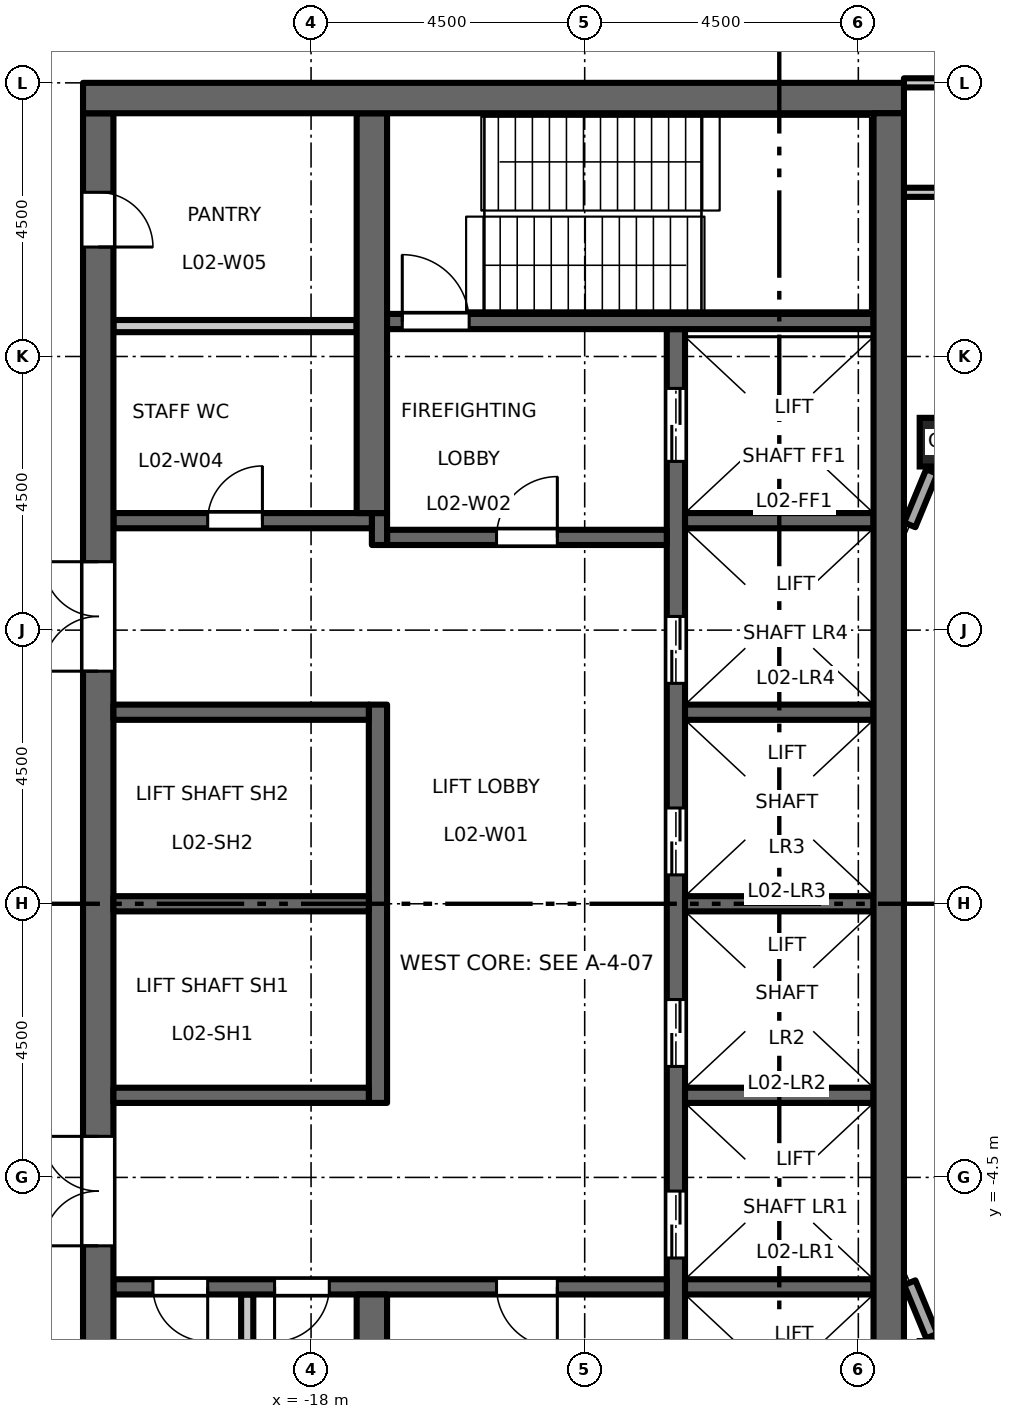
"""IFC4 building model, lengths in metres.
Left out: names, types, materials, properties, quantities, classifications, styles, units other than length and angle.
Written with IfcOpenShell. Run it as: python <this file> out.ifc"""

import sys

from ifc_helpers import new_model, si_unit, direction, frame, frame_2d, origin, origin_2d, place, context, subcontext, project, spatial, rectangle, hollow_rectangle, extrude, element, fill, save


model = new_model("IFC4")
c1 = context("Model", 3, precision=1e-05, world=origin(), true_north=direction((0.0, 1.0)))
c2 = subcontext(c1, "Body", "Model", "MODEL_VIEW")
j1 = project(units=[si_unit("LENGTHUNIT", "METRE"), si_unit("PLANEANGLEUNIT", "RADIAN")], contexts=[c1])
p1 = place(None, origin())
s1 = spatial("IfcSite", under=j1, at=p1, CompositionType="ELEMENT")
p2 = place(p1, origin())
s2 = spatial("IfcBuilding", under=s1, at=p2, CompositionType="ELEMENT")
p3 = place(p2, frame((0.0, 0.0, 12.2)))
s3 = spatial("IfcBuildingStorey", under=s2, at=p3, CompositionType="ELEMENT", Elevation=12.2)
p4 = place(p3, frame((-7.591, 7.591, 0.0), z_axis=(0.0, 0.0, 1.0), x_axis=(1.0, 0.0, 0.0)))
e1 = element("IfcColumn", 1, at=p4, inside=s3, PredefinedType="COLUMN", context=c2, shape_type="SweptSolid", body=[
    extrude(hollow_rectangle(XDim=0.8, YDim=0.8, WallThickness=0.05, at=origin_2d()), origin(), (0.0, 0.0, 1.0), 5.0),
])
p5 = place(p3, frame((-12.0, -9.45, 0.0), z_axis=(0.0, 0.0, 1.0), x_axis=(0.0, 1.0, 0.0)))
e2 = element("IfcWall", 2, at=p5, inside=s3, PredefinedType="SHEAR", context=c2, shape_type="SweptSolid", body=[
    extrude(rectangle(XDim=18.9, YDim=0.3, at=frame_2d((9.45, 0.0))), origin(), (0.0, 0.0, 1.0), 4.85),
])
p6 = place(p5, frame((3.625, 0.0, 0.0)))
e3 = element("IfcOpeningElement", 3, at=p6, cuts=e2, PredefinedType="OPENING", context=c2, shape_type="SweptSolid", body=[
    extrude(rectangle(XDim=1.1, YDim=2.1, at=frame_2d((0.55, 1.05))), frame((0.0, 0.16, 0.0), z_axis=(0.0, -1.0, 0.0), x_axis=(1.0, 0.0, 0.0)), (0.0, 0.0, 1.0), 0.32),
])
p7 = place(p5, frame((6.775, 0.0, 0.0)))
e4 = element("IfcOpeningElement", 4, at=p7, cuts=e2, PredefinedType="OPENING", context=c2, shape_type="SweptSolid", body=[
    extrude(rectangle(XDim=1.1, YDim=2.1, at=frame_2d((0.55, 1.05))), frame((0.0, 0.16, 0.0), z_axis=(0.0, -1.0, 0.0), x_axis=(1.0, 0.0, 0.0)), (0.0, 0.0, 1.0), 0.32),
])
p8 = place(p5, frame((9.925, 0.0, 0.0)))
e5 = element("IfcOpeningElement", 5, at=p8, cuts=e2, PredefinedType="OPENING", context=c2, shape_type="SweptSolid", body=[
    extrude(rectangle(XDim=1.1, YDim=2.1, at=frame_2d((0.55, 1.05))), frame((0.0, 0.16, 0.0), z_axis=(0.0, -1.0, 0.0), x_axis=(1.0, 0.0, 0.0)), (0.0, 0.0, 1.0), 0.32),
])
p9 = place(p5, frame((13.075, 0.0, 0.0)))
e6 = element("IfcOpeningElement", 6, at=p9, cuts=e2, PredefinedType="OPENING", context=c2, shape_type="SweptSolid", body=[
    extrude(rectangle(XDim=1.1, YDim=2.1, at=frame_2d((0.55, 1.05))), frame((0.0, 0.16, 0.0), z_axis=(0.0, -1.0, 0.0), x_axis=(1.0, 0.0, 0.0)), (0.0, 0.0, 1.0), 0.32),
])
p10 = place(p5, frame((16.725, 0.0, 0.0)))
e7 = element("IfcOpeningElement", 7, at=p10, cuts=e2, PredefinedType="OPENING", context=c2, shape_type="SweptSolid", body=[
    extrude(rectangle(XDim=1.2, YDim=2.1, at=frame_2d((0.6, 1.05))), frame((0.0, 0.16, 0.0), z_axis=(0.0, -1.0, 0.0), x_axis=(1.0, 0.0, 0.0)), (0.0, 0.0, 1.0), 0.32),
])
p11 = place(p5, frame((0.975, 0.0, 0.0)))
e8 = element("IfcOpeningElement", 8, at=p11, cuts=e2, PredefinedType="OPENING", context=c2, shape_type="SweptSolid", body=[
    extrude(rectangle(XDim=1.2, YDim=2.1, at=frame_2d((0.6, 1.05))), frame((0.0, 0.16, 0.0), z_axis=(0.0, -1.0, 0.0), x_axis=(1.0, 0.0, 0.0)), (0.0, 0.0, 1.0), 0.32),
])
p12 = place(p3, frame((-12.15, 6.025, 0.0), z_axis=(0.0, 0.0, 1.0), x_axis=(-1.0, 0.0, 0.0)))
e9 = element("IfcWall", 9, at=p12, inside=s3, PredefinedType="SHEAR", context=c2, shape_type="SweptSolid", body=[
    extrude(rectangle(XDim=4.6, YDim=0.25, at=frame_2d((2.3, 0.0))), origin(), (0.0, 0.0, 1.0), 4.85),
])
p13 = place(p12, frame((1.8, 0.0, 0.0)))
e10 = element("IfcOpeningElement", 10, at=p13, cuts=e9, PredefinedType="OPENING", context=c2, shape_type="SweptSolid", body=[
    extrude(rectangle(XDim=1.0, YDim=2.1, at=frame_2d((0.5, 1.05))), frame((0.0, 0.135, 0.0), z_axis=(0.0, -1.0, 0.0), x_axis=(1.0, 0.0, 0.0)), (0.0, 0.0, 1.0), 0.27),
])
p14 = place(p3, frame((-16.875, 5.9, 0.0), z_axis=(0.0, 0.0, 1.0), x_axis=(0.0, 1.0, 0.0)))
e11 = element("IfcWall", 11, at=p14, inside=s3, PredefinedType="SHEAR", context=c2, shape_type="SweptSolid", body=[
    extrude(rectangle(XDim=0.525, YDim=0.25, at=frame_2d((0.263, 0.0))), origin(), (0.0, 0.0, 1.0), 4.85),
])
p15 = place(p3, frame((-17.0, 6.3, 0.0), z_axis=(0.0, 0.0, 1.0), x_axis=(-1.0, 0.0, 0.0)))
e12 = element("IfcWall", 12, at=p15, inside=s3, PredefinedType="SHEAR", context=c2, shape_type="SweptSolid", body=[
    extrude(rectangle(XDim=4.25, YDim=0.25, at=frame_2d((2.125, 0.0))), origin(), (0.0, 0.0, 1.0), 4.85),
])
p16 = place(p15, frame((1.8, 0.0, 0.0)))
e13 = element("IfcOpeningElement", 13, at=p16, cuts=e12, PredefinedType="OPENING", context=c2, shape_type="SweptSolid", body=[
    extrude(rectangle(XDim=0.9, YDim=2.1, at=frame_2d((0.45, 1.05))), frame((0.0, 0.135, 0.0), z_axis=(0.0, -1.0, 0.0), x_axis=(1.0, 0.0, 0.0)), (0.0, 0.0, 1.0), 0.27),
])
p17 = place(p3, frame((-12.15, -6.3, 0.0), z_axis=(0.0, 0.0, 1.0), x_axis=(-1.0, 0.0, 0.0)))
e14 = element("IfcWall", 14, at=p17, inside=s3, PredefinedType="SHEAR", context=c2, shape_type="SweptSolid", body=[
    extrude(rectangle(XDim=9.1, YDim=0.25, at=frame_2d((4.55, 0.0))), origin(), (0.0, 0.0, 1.0), 4.85),
])
p18 = place(p17, frame((1.8, 0.0, 0.0)))
e15 = element("IfcOpeningElement", 15, at=p18, cuts=e14, PredefinedType="OPENING", context=c2, shape_type="SweptSolid", body=[
    extrude(rectangle(XDim=1.0, YDim=2.1, at=frame_2d((0.5, 1.05))), frame((0.0, 0.135, 0.0), z_axis=(0.0, -1.0, 0.0), x_axis=(1.0, 0.0, 0.0)), (0.0, 0.0, 1.0), 0.27),
])
p19 = place(p17, frame((5.55, 0.0, 0.0)))
e16 = element("IfcOpeningElement", 16, at=p19, cuts=e14, PredefinedType="OPENING", context=c2, shape_type="SweptSolid", body=[
    extrude(rectangle(XDim=0.9, YDim=2.1, at=frame_2d((0.45, 1.05))), frame((0.0, 0.135, 0.0), z_axis=(0.0, -1.0, 0.0), x_axis=(1.0, 0.0, 0.0)), (0.0, 0.0, 1.0), 0.27),
])
p20 = place(p17, frame((7.55, 0.0, 0.0)))
e17 = element("IfcOpeningElement", 17, at=p20, cuts=e14, PredefinedType="OPENING", context=c2, shape_type="SweptSolid", body=[
    extrude(rectangle(XDim=0.9, YDim=2.1, at=frame_2d((0.45, 1.05))), frame((0.0, 0.135, 0.0), z_axis=(0.0, -1.0, 0.0), x_axis=(1.0, 0.0, 0.0)), (0.0, 0.0, 1.0), 0.27),
])
p21 = place(p3, frame((-21.5, -13.0, 0.0), z_axis=(0.0, 0.0, 1.0), x_axis=(0.0, 1.0, 0.0)))
e18 = element("IfcWall", 18, at=p21, inside=s3, PredefinedType="SHEAR", context=c2, shape_type="SweptSolid", body=[
    extrude(rectangle(XDim=26.0, YDim=0.5, at=frame_2d((13.0, 0.0))), origin(), (0.0, 0.0, 1.0), 4.85),
])
p22 = place(p21, frame((16.825, 0.0, 0.0)))
e19 = element("IfcOpeningElement", 19, at=p22, cuts=e18, PredefinedType="OPENING", context=c2, shape_type="SweptSolid", body=[
    extrude(rectangle(XDim=1.8, YDim=2.1, at=frame_2d((0.9, 1.05))), frame((0.0, 0.26, 0.0), z_axis=(0.0, -1.0, 0.0), x_axis=(1.0, 0.0, 0.0)), (0.0, 0.0, 1.0), 0.52),
])
p23 = place(p21, frame((7.375, 0.0, 0.0)))
e20 = element("IfcOpeningElement", 20, at=p23, cuts=e18, PredefinedType="OPENING", context=c2, shape_type="SweptSolid", body=[
    extrude(rectangle(XDim=1.8, YDim=2.1, at=frame_2d((0.9, 1.05))), frame((0.0, 0.26, 0.0), z_axis=(0.0, -1.0, 0.0), x_axis=(1.0, 0.0, 0.0)), (0.0, 0.0, 1.0), 0.52),
])
p24 = place(p21, frame((23.8, 0.0, 0.0)))
e21 = element("IfcOpeningElement", 21, at=p24, cuts=e18, PredefinedType="OPENING", context=c2, shape_type="SweptSolid", body=[
    extrude(rectangle(XDim=0.9, YDim=2.1, at=frame_2d((0.45, 1.05))), frame((0.0, 0.26, 0.0), z_axis=(0.0, -1.0, 0.0), x_axis=(1.0, 0.0, 0.0)), (0.0, 0.0, 1.0), 0.52),
])
p25 = place(p3, frame((-17.25, 9.5, 0.0), z_axis=(0.0, 0.0, 1.0), x_axis=(-1.0, 0.0, 0.0)))
e22 = element("IfcWall", 22, at=p25, inside=s3, PredefinedType="PARTITIONING", context=c2, shape_type="SweptSolid", body=[
    extrude(rectangle(XDim=4.0, YDim=0.2, at=frame_2d((2.0, 0.0))), origin(), (0.0, 0.0, 1.0), 4.85),
])
p26 = place(p3, frame((-19.05, -13.0, 0.0), z_axis=(0.0, 0.0, 1.0), x_axis=(0.0, 1.0, 0.0)))
e23 = element("IfcWall", 23, at=p26, inside=s3, PredefinedType="PARTITIONING", context=c2, shape_type="SweptSolid", body=[
    extrude(rectangle(XDim=6.575, YDim=0.2, at=frame_2d((3.288, 0.0))), origin(), (0.0, 0.0, 1.0), 4.85),
])
p27 = place(p3, frame((-16.9, -3.275, 0.0), z_axis=(0.0, 0.0, 1.0), x_axis=(0.0, 1.0, 0.0)))
e24 = element("IfcWall", 24, at=p27, inside=s3, PredefinedType="SHEAR", context=c2, shape_type="SweptSolid", body=[
    extrude(rectangle(XDim=6.55, YDim=0.3, at=frame_2d((3.275, 0.0))), origin(), (0.0, 0.0, 1.0), 4.85),
])
for number, where, z_axis, x_axis in (
    (25, (-17.05, 0.0, 0.0), (0.0, 0.0, 1.0), (-1.0, 0.0, 0.0)),
    (26, (-17.05, 3.15, 0.0), (0.0, 0.0, 1.0), (-1.0, 0.0, 0.0)),
    (27, (-17.05, -3.15, 0.0), (0.0, 0.0, 1.0), (-1.0, 0.0, 0.0)),
):
    element("IfcWall", number, at=place(p3, frame(where, z_axis=z_axis, x_axis=x_axis)), inside=s3, PredefinedType="SHEAR", context=c2, shape_type="SweptSolid", body=[
        extrude(rectangle(XDim=4.2, YDim=0.25, at=frame_2d((2.1, 0.0))), origin(), (0.0, 0.0, 1.0), 4.85),
    ])
for number, where, z_axis, x_axis in (
    (28, (-17.0, 6.425, 0.0), (0.0, 0.0, 1.0), (0.0, 1.0, 0.0)),
    (29, (-17.0, -13.0, 0.0), (0.0, 0.0, 1.0), (0.0, 1.0, 0.0)),
):
    element("IfcWall", number, at=place(p3, frame(where, z_axis=z_axis, x_axis=x_axis)), inside=s3, PredefinedType="SHEAR", context=c2, shape_type="SweptSolid", body=[
        extrude(rectangle(XDim=6.575, YDim=0.5, at=frame_2d((3.288, 0.0))), origin(), (0.0, 0.0, 1.0), 4.85),
    ])
for number, where, z_axis, x_axis in (
    (30, (-8.75, 0.0, 0.0), (0.0, 0.0, 1.0), (-1.0, 0.0, 0.0)),
    (31, (-8.75, 3.15, 0.0), (0.0, 0.0, 1.0), (-1.0, 0.0, 0.0)),
    (32, (-8.75, 6.3, 0.0), (0.0, 0.0, 1.0), (-1.0, 0.0, 0.0)),
    (33, (-8.75, -3.15, 0.0), (0.0, 0.0, 1.0), (-1.0, 0.0, 0.0)),
    (34, (-8.75, -6.3, 0.0), (0.0, 0.0, 1.0), (-1.0, 0.0, 0.0)),
):
    element("IfcWall", number, at=place(p3, frame(where, z_axis=z_axis, x_axis=x_axis)), inside=s3, PredefinedType="SHEAR", context=c2, shape_type="SweptSolid", body=[
        extrude(rectangle(XDim=3.1, YDim=0.25, at=frame_2d((1.55, 0.0))), origin(), (0.0, 0.0, 1.0), 4.85),
    ])
p28 = place(p3, frame((-8.75, 9.575, 0.0), z_axis=(0.0, 0.0, 1.0), x_axis=(-1.0, 0.0, 0.0)))
e35 = element("IfcWall", 35, at=p28, inside=s3, PredefinedType="SHEAR", context=c2, shape_type="SweptSolid", body=[
    extrude(rectangle(XDim=8.0, YDim=0.25, at=frame_2d((4.0, 0.0))), origin(), (0.0, 0.0, 1.0), 4.85),
])
p29 = place(p28, frame((6.65, 0.0, 0.0)))
e36 = element("IfcOpeningElement", 36, at=p29, cuts=e35, PredefinedType="OPENING", context=c2, shape_type="SweptSolid", body=[
    extrude(rectangle(XDim=1.1, YDim=2.1, at=frame_2d((0.55, 1.05))), frame((0.0, 0.135, 0.0), z_axis=(0.0, -1.0, 0.0), x_axis=(1.0, 0.0, 0.0)), (0.0, 0.0, 1.0), 0.27),
])
p30 = place(p3, frame((-8.25, 13.25, 0.0), z_axis=(0.0, 0.0, 1.0), x_axis=(-1.0, 0.0, 0.0)))
e37 = element("IfcWall", 37, at=p30, inside=s3, PredefinedType="SHEAR", context=c2, shape_type="SweptSolid", body=[
    extrude(rectangle(XDim=13.5, YDim=0.5, at=frame_2d((6.75, 0.0))), origin(), (0.0, 0.0, 1.0), 4.85),
])
p31 = place(p3, frame((-8.5, -13.0, 0.0), z_axis=(0.0, 0.0, 1.0), x_axis=(0.0, 1.0, 0.0)))
e38 = element("IfcWall", 38, at=p31, inside=s3, PredefinedType="SHEAR", context=c2, shape_type="SweptSolid", body=[
    extrude(rectangle(XDim=26.0, YDim=0.5, at=frame_2d((13.0, 0.0))), origin(), (0.0, 0.0, 1.0), 4.85),
])
for number, where, z_axis, x_axis in (
    (39, (-7.791, 7.108, 0.0), (0.0, 0.0, 1.0), (-0.383, -0.924, 0.0)),
    (40, (-8.154, -6.231, 0.0), (0.0, 0.0, 1.0), (0.383, -0.924, 0.0)),
):
    element("IfcWall", number, at=place(p3, frame(where, z_axis=z_axis, x_axis=x_axis)), inside=s3, PredefinedType="STANDARD", context=c2, shape_type="SweptSolid", body=[
        extrude(rectangle(XDim=0.949, YDim=0.2, at=frame_2d((0.475, 0.0))), origin(), (0.0, 0.0, 1.0), 4.23),
    ])
p32 = place(p3, frame((-8.25, 11.7, 0.0), z_axis=(0.0, 0.0, 1.0), x_axis=(1.0, 0.0, 0.0)))
e41 = element("IfcWall", 41, at=p32, inside=s3, PredefinedType="PARTITIONING", context=c2, shape_type="SweptSolid", body=[
    extrude(rectangle(XDim=15.25, YDim=0.15, at=frame_2d((7.625, 0.0))), origin(), (0.0, 0.0, 1.0), 4.85),
])
p33 = place(p32, frame((0.65, 0.0, 0.0)))
e42 = element("IfcOpeningElement", 42, at=p33, cuts=e41, PredefinedType="OPENING", context=c2, shape_type="SweptSolid", body=[
    extrude(rectangle(XDim=1.0, YDim=2.1, at=frame_2d((0.5, 1.05))), frame((0.0, 0.085, 0.0), z_axis=(0.0, -1.0, 0.0), x_axis=(1.0, 0.0, 0.0)), (0.0, 0.0, 1.0), 0.17),
])
p34 = place(p32, frame((11.4, 0.0, 0.0)))
e43 = element("IfcOpeningElement", 43, at=p34, cuts=e41, PredefinedType="OPENING", context=c2, shape_type="SweptSolid", body=[
    extrude(rectangle(XDim=1.0, YDim=2.1, at=frame_2d((0.5, 1.05))), frame((0.0, 0.085, 0.0), z_axis=(0.0, -1.0, 0.0), x_axis=(1.0, 0.0, 0.0)), (0.0, 0.0, 1.0), 0.17),
])
p35 = place(p32, frame((13.65, 0.0, 0.0)))
e44 = element("IfcOpeningElement", 44, at=p35, cuts=e41, PredefinedType="OPENING", context=c2, shape_type="SweptSolid", body=[
    extrude(rectangle(XDim=1.0, YDim=2.1, at=frame_2d((0.5, 1.05))), frame((0.0, 0.085, 0.0), z_axis=(0.0, -1.0, 0.0), x_axis=(1.0, 0.0, 0.0)), (0.0, 0.0, 1.0), 0.17),
])
p36 = place(p3, frame((-8.25, 13.5, 0.0), z_axis=(0.0, 0.0, 1.0), x_axis=(1.0, 0.0, 0.0)))
e45 = element("IfcWall", 45, at=p36, inside=s3, PredefinedType="PARTITIONING", context=c2, shape_type="SweptSolid", body=[
    extrude(rectangle(XDim=16.5, YDim=0.15, at=frame_2d((8.25, 0.0))), origin(), (0.0, 0.0, 1.0), 4.35),
])
p37 = place(p36, frame((6.65, 0.0, 0.0)))
e46 = element("IfcOpeningElement", 46, at=p37, cuts=e45, PredefinedType="OPENING", context=c2, shape_type="SweptSolid", body=[
    extrude(rectangle(XDim=1.0, YDim=2.1, at=frame_2d((0.5, 1.05))), frame((0.0, 0.085, 0.0), z_axis=(0.0, -1.0, 0.0), x_axis=(1.0, 0.0, 0.0)), (0.0, 0.0, 1.0), 0.17),
])
p38 = place(p13, origin())
e47 = element("IfcDoor", 47, at=p38, inside=s3, OperationType="SINGLE_SWING_LEFT", PredefinedType="DOOR", context=c2, shape_type="SweptSolid", body=[
    extrude(rectangle(XDim=1.0, YDim=2.1, at=frame_2d((0.5, 1.05))), frame((0.0, 0.025, 0.0), z_axis=(0.0, -1.0, 0.0), x_axis=(1.0, 0.0, 0.0)), (0.0, 0.0, 1.0), 0.05),
])
fill(e10, e47)
p39 = place(p18, origin())
e48 = element("IfcDoor", 48, at=p39, inside=s3, OperationType="SINGLE_SWING_RIGHT", PredefinedType="DOOR", context=c2, shape_type="SweptSolid", body=[
    extrude(rectangle(XDim=1.0, YDim=2.1, at=frame_2d((0.5, 1.05))), frame((0.0, 0.025, 0.0), z_axis=(0.0, -1.0, 0.0), x_axis=(1.0, 0.0, 0.0)), (0.0, 0.0, 1.0), 0.05),
])
fill(e15, e48)
p40 = place(p29, origin())
e49 = element("IfcDoor", 49, at=p40, inside=s3, OperationType="SINGLE_SWING_RIGHT", PredefinedType="DOOR", context=c2, shape_type="SweptSolid", body=[
    extrude(rectangle(XDim=1.1, YDim=2.1, at=frame_2d((0.55, 1.05))), frame((0.0, 0.025, 0.0), z_axis=(0.0, -1.0, 0.0), x_axis=(1.0, 0.0, 0.0)), (0.0, 0.0, 1.0), 0.05),
])
fill(e36, e49)
p41 = place(p22, origin())
e50 = element("IfcDoor", 50, at=p41, inside=s3, OperationType="DOUBLE_DOOR_DOUBLE_SWING", PredefinedType="DOOR", context=c2, shape_type="SweptSolid", body=[
    extrude(rectangle(XDim=1.8, YDim=2.1, at=frame_2d((0.9, 1.05))), frame((0.0, 0.025, 0.0), z_axis=(0.0, -1.0, 0.0), x_axis=(1.0, 0.0, 0.0)), (0.0, 0.0, 1.0), 0.05),
])
fill(e19, e50)
p42 = place(p23, origin())
e51 = element("IfcDoor", 51, at=p42, inside=s3, OperationType="DOUBLE_DOOR_DOUBLE_SWING", PredefinedType="DOOR", context=c2, shape_type="SweptSolid", body=[
    extrude(rectangle(XDim=1.8, YDim=2.1, at=frame_2d((0.9, 1.05))), frame((0.0, 0.025, 0.0), z_axis=(0.0, -1.0, 0.0), x_axis=(1.0, 0.0, 0.0)), (0.0, 0.0, 1.0), 0.05),
])
fill(e20, e51)
p43 = place(p6, origin())
e52 = element("IfcDoor", 52, at=p43, inside=s3, OperationType="DOUBLE_DOOR_SLIDING", PredefinedType="DOOR", context=c2, shape_type="SweptSolid", body=[
    extrude(rectangle(XDim=1.1, YDim=2.1, at=frame_2d((0.55, 1.05))), frame((0.0, 0.025, 0.0), z_axis=(0.0, -1.0, 0.0), x_axis=(1.0, 0.0, 0.0)), (0.0, 0.0, 1.0), 0.05),
])
fill(e3, e52)
p44 = place(p7, origin())
e53 = element("IfcDoor", 53, at=p44, inside=s3, OperationType="DOUBLE_DOOR_SLIDING", PredefinedType="DOOR", context=c2, shape_type="SweptSolid", body=[
    extrude(rectangle(XDim=1.1, YDim=2.1, at=frame_2d((0.55, 1.05))), frame((0.0, 0.025, 0.0), z_axis=(0.0, -1.0, 0.0), x_axis=(1.0, 0.0, 0.0)), (0.0, 0.0, 1.0), 0.05),
])
fill(e4, e53)
p45 = place(p8, origin())
e54 = element("IfcDoor", 54, at=p45, inside=s3, OperationType="DOUBLE_DOOR_SLIDING", PredefinedType="DOOR", context=c2, shape_type="SweptSolid", body=[
    extrude(rectangle(XDim=1.1, YDim=2.1, at=frame_2d((0.55, 1.05))), frame((0.0, 0.025, 0.0), z_axis=(0.0, -1.0, 0.0), x_axis=(1.0, 0.0, 0.0)), (0.0, 0.0, 1.0), 0.05),
])
fill(e5, e54)
p46 = place(p9, origin())
e55 = element("IfcDoor", 55, at=p46, inside=s3, OperationType="DOUBLE_DOOR_SLIDING", PredefinedType="DOOR", context=c2, shape_type="SweptSolid", body=[
    extrude(rectangle(XDim=1.1, YDim=2.1, at=frame_2d((0.55, 1.05))), frame((0.0, 0.025, 0.0), z_axis=(0.0, -1.0, 0.0), x_axis=(1.0, 0.0, 0.0)), (0.0, 0.0, 1.0), 0.05),
])
fill(e6, e55)
p47 = place(p10, origin())
e56 = element("IfcDoor", 56, at=p47, inside=s3, OperationType="DOUBLE_DOOR_SLIDING", PredefinedType="DOOR", context=c2, shape_type="SweptSolid", body=[
    extrude(rectangle(XDim=1.2, YDim=2.1, at=frame_2d((0.6, 1.05))), frame((0.0, 0.025, 0.0), z_axis=(0.0, -1.0, 0.0), x_axis=(1.0, 0.0, 0.0)), (0.0, 0.0, 1.0), 0.05),
])
fill(e7, e56)
p48 = place(p16, origin())
e57 = element("IfcDoor", 57, at=p48, inside=s3, OperationType="SINGLE_SWING_LEFT", PredefinedType="DOOR", context=c2, shape_type="SweptSolid", body=[
    extrude(rectangle(XDim=0.9, YDim=2.1, at=frame_2d((0.45, 1.05))), frame((0.0, 0.025, 0.0), z_axis=(0.0, -1.0, 0.0), x_axis=(1.0, 0.0, 0.0)), (0.0, 0.0, 1.0), 0.05),
])
fill(e13, e57)
p49 = place(p24, origin())
e58 = element("IfcDoor", 58, at=p49, inside=s3, OperationType="SINGLE_SWING_LEFT", PredefinedType="DOOR", context=c2, shape_type="SweptSolid", body=[
    extrude(rectangle(XDim=0.9, YDim=2.1, at=frame_2d((0.45, 1.05))), frame((0.0, 0.025, 0.0), z_axis=(0.0, -1.0, 0.0), x_axis=(1.0, 0.0, 0.0)), (0.0, 0.0, 1.0), 0.05),
])
fill(e21, e58)
p50 = place(p19, origin())
e59 = element("IfcDoor", 59, at=p50, inside=s3, OperationType="SINGLE_SWING_LEFT", PredefinedType="DOOR", context=c2, shape_type="SweptSolid", body=[
    extrude(rectangle(XDim=0.9, YDim=2.1, at=frame_2d((0.45, 1.05))), frame((0.0, 0.025, 0.0), z_axis=(0.0, -1.0, 0.0), x_axis=(1.0, 0.0, 0.0)), (0.0, 0.0, 1.0), 0.05),
])
fill(e16, e59)
p51 = place(p20, origin())
e60 = element("IfcDoor", 60, at=p51, inside=s3, OperationType="SINGLE_SWING_RIGHT", PredefinedType="DOOR", context=c2, shape_type="SweptSolid", body=[
    extrude(rectangle(XDim=0.9, YDim=2.1, at=frame_2d((0.45, 1.05))), frame((0.0, 0.025, 0.0), z_axis=(0.0, -1.0, 0.0), x_axis=(1.0, 0.0, 0.0)), (0.0, 0.0, 1.0), 0.05),
])
fill(e17, e60)
save(model, sys.argv[1])
